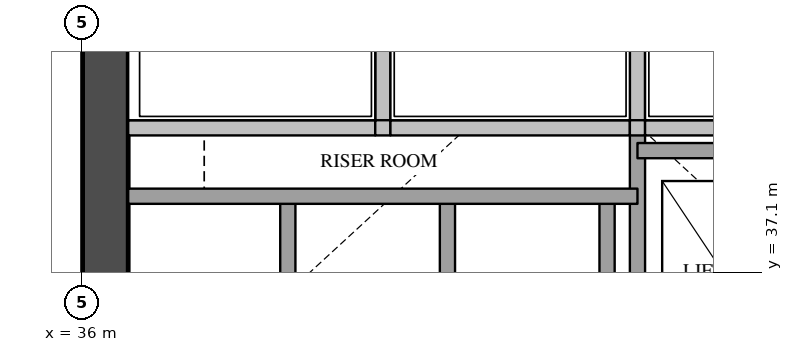
"""IFC4 building model, lengths in metres.
Left out: names, types, materials, properties, quantities, classifications, styles, units other than length and angle.
Written with IfcOpenShell. Run it as: python <this file> out.ifc"""

import sys

from ifc_helpers import new_model, si_unit, direction, frame, frame_2d, origin, place, context, subcontext, project, spatial, rectangle, extrude, element, save


model = new_model("IFC4")
c1 = context("Model", 3, precision=1e-05, world=origin(), true_north=direction((0.0, 1.0)))
c2 = subcontext(c1, "Body", "Model", "MODEL_VIEW")
j1 = project(units=[si_unit("LENGTHUNIT", "METRE"), si_unit("PLANEANGLEUNIT", "RADIAN")], contexts=[c1])
p1 = place(None, origin())
s1 = spatial("IfcSite", under=j1, at=p1, CompositionType="ELEMENT")
p2 = place(p1, origin())
s2 = spatial("IfcBuilding", under=s1, at=p2, CompositionType="ELEMENT")
p3 = place(p2, frame((0.0, 0.0, 46.2)))
s3 = spatial("IfcBuildingStorey", under=s2, at=p3, CompositionType="ELEMENT", Elevation=46.2)
p4 = place(p3, frame((36.3, 29.1, 0.0), z_axis=(0.0, 0.0, 1.0), x_axis=(0.0, 1.0, 0.0)))
e1 = element("IfcWall", 1, at=p4, inside=s3, PredefinedType="SHEAR", context=c2, shape_type="SweptSolid", body=[
    extrude(rectangle(XDim=20.3, YDim=0.6, at=frame_2d((10.15, 0.0))), origin(), (0.0, 0.0, 1.0), 3.5),
])
p5 = place(p4, frame((3.6, 0.0, 0.0)))
e2 = element("IfcOpeningElement", 2, at=p5, cuts=e1, PredefinedType="OPENING", context=c2, shape_type="SweptSolid", body=[
    extrude(rectangle(XDim=1.8, YDim=2.1, at=frame_2d((0.9, 1.05))), frame((0.0, 0.31, 0.0), z_axis=(0.0, -1.0, 0.0), x_axis=(1.0, 0.0, 0.0)), (0.0, 0.0, 1.0), 0.62),
])
p6 = place(p4, frame((16.4, 0.0, 0.0)))
e3 = element("IfcOpeningElement", 3, at=p6, cuts=e1, PredefinedType="OPENING", context=c2, shape_type="SweptSolid", body=[
    extrude(rectangle(XDim=1.0, YDim=2.1, at=frame_2d((0.5, 1.05))), frame((0.0, 0.31, 0.0), z_axis=(0.0, -1.0, 0.0), x_axis=(1.0, 0.0, 0.0)), (0.0, 0.0, 1.0), 0.62),
])
p7 = place(p3, frame((38.7, 34.9, 0.0), z_axis=(0.0, 0.0, 1.0), x_axis=(0.0, 1.0, 0.0)))
e4 = element("IfcWall", 4, at=p7, inside=s3, PredefinedType="SOLIDWALL", context=c2, shape_type="SweptSolid", body=[
    extrude(rectangle(XDim=3.2, YDim=0.2, at=frame_2d((1.6, 0.0))), origin(), (0.0, 0.0, 1.0), 3.5),
])
p8 = place(p3, frame((39.95, 39.0, 0.0), z_axis=(0.0, 0.0, 1.0), x_axis=(0.0, 1.0, 0.0)))
e5 = element("IfcWall", 5, at=p8, inside=s3, PredefinedType="SOLIDWALL", context=c2, shape_type="SweptSolid", body=[
    extrude(rectangle(XDim=1.78, YDim=0.2, at=frame_2d((0.89, 0.0))), origin(), (0.0, 0.0, 1.0), 3.5),
])
for number, where, z_axis, x_axis in (
    (6, (40.8, 34.9, 0.0), (0.0, 0.0, 1.0), (0.0, 1.0, 0.0)),
    (7, (42.9, 34.9, 0.0), (0.0, 0.0, 1.0), (0.0, 1.0, 0.0)),
):
    element("IfcWall", number, at=place(p3, frame(where, z_axis=z_axis, x_axis=x_axis)), inside=s3, PredefinedType="SOLIDWALL", context=c2, shape_type="SweptSolid", body=[
        extrude(rectangle(XDim=3.2, YDim=0.2, at=frame_2d((1.6, 0.0))), origin(), (0.0, 0.0, 1.0), 3.5),
    ])
p9 = place(p3, frame((43.3, 29.1, 0.0), z_axis=(0.0, 0.0, 1.0), x_axis=(0.0, 1.0, 0.0)))
e8 = element("IfcWall", 8, at=p9, inside=s3, PredefinedType="SOLIDWALL", context=c2, shape_type="SweptSolid", body=[
    extrude(rectangle(XDim=9.9, YDim=0.2, at=frame_2d((4.95, 0.0))), origin(), (0.0, 0.0, 1.0), 3.5),
])
p10 = place(p3, frame((43.3, 39.0, 0.0), z_axis=(0.0, 0.0, 1.0), x_axis=(0.0, 1.0, 0.0)))
e9 = element("IfcWall", 9, at=p10, inside=s3, PredefinedType="SOLIDWALL", context=c2, shape_type="SweptSolid", body=[
    extrude(rectangle(XDim=1.78, YDim=0.2, at=frame_2d((0.89, 0.0))), origin(), (0.0, 0.0, 1.0), 3.5),
])
p11 = place(p3, frame((36.6, 38.1, 0.0), z_axis=(0.0, 0.0, 1.0), x_axis=(1.0, 0.0, 0.0)))
e10 = element("IfcWall", 10, at=p11, inside=s3, PredefinedType="SOLIDWALL", context=c2, shape_type="SweptSolid", body=[
    extrude(rectangle(XDim=6.7, YDim=0.2, at=frame_2d((3.35, 0.0))), origin(), (0.0, 0.0, 1.0), 3.5),
])
p12 = place(p3, frame((43.3, 38.7, 0.0), z_axis=(0.0, 0.0, 1.0), x_axis=(1.0, 0.0, 0.0)))
e11 = element("IfcWall", 11, at=p12, inside=s3, PredefinedType="SOLIDWALL", context=c2, shape_type="SweptSolid", body=[
    extrude(rectangle(XDim=4.5, YDim=0.2, at=frame_2d((2.25, 0.0))), origin(), (0.0, 0.0, 1.0), 3.5),
])
p13 = place(p3, frame((36.6, 39.0, 0.0), z_axis=(0.0, 0.0, 1.0), x_axis=(1.0, 0.0, 0.0)))
e12 = element("IfcWall", 12, at=p13, inside=s3, PredefinedType="SOLIDWALL", context=c2, shape_type="SweptSolid", body=[
    extrude(rectangle(XDim=3.25, YDim=0.2, at=frame_2d((1.625, 0.0))), origin(), (0.0, 0.0, 1.0), 3.5),
])
p14 = place(p3, frame((39.85, 39.0, 0.0), z_axis=(0.0, 0.0, 1.0), x_axis=(1.0, 0.0, 0.0)))
e13 = element("IfcWall", 13, at=p14, inside=s3, PredefinedType="SOLIDWALL", context=c2, shape_type="SweptSolid", body=[
    extrude(rectangle(XDim=0.2, YDim=0.2, at=frame_2d((0.1, 0.0))), origin(), (0.0, 0.0, 1.0), 3.5),
])
p15 = place(p3, frame((40.05, 39.0, 0.0), z_axis=(0.0, 0.0, 1.0), x_axis=(1.0, 0.0, 0.0)))
e14 = element("IfcWall", 14, at=p15, inside=s3, PredefinedType="SOLIDWALL", context=c2, shape_type="SweptSolid", body=[
    extrude(rectangle(XDim=3.15, YDim=0.2, at=frame_2d((1.575, 0.0))), origin(), (0.0, 0.0, 1.0), 3.5),
])
p16 = place(p3, frame((43.2, 39.0, 0.0), z_axis=(0.0, 0.0, 1.0), x_axis=(1.0, 0.0, 0.0)))
e15 = element("IfcWall", 15, at=p16, inside=s3, PredefinedType="SOLIDWALL", context=c2, shape_type="SweptSolid", body=[
    extrude(rectangle(XDim=0.2, YDim=0.2, at=frame_2d((0.1, 0.0))), origin(), (0.0, 0.0, 1.0), 3.5),
])
p17 = place(p3, frame((43.4, 39.0, 0.0), z_axis=(0.0, 0.0, 1.0), x_axis=(1.0, 0.0, 0.0)))
e16 = element("IfcWall", 16, at=p17, inside=s3, PredefinedType="SOLIDWALL", context=c2, shape_type="SweptSolid", body=[
    extrude(rectangle(XDim=3.25, YDim=0.2, at=frame_2d((1.625, 0.0))), origin(), (0.0, 0.0, 1.0), 3.5),
])
save(model, sys.argv[1])
